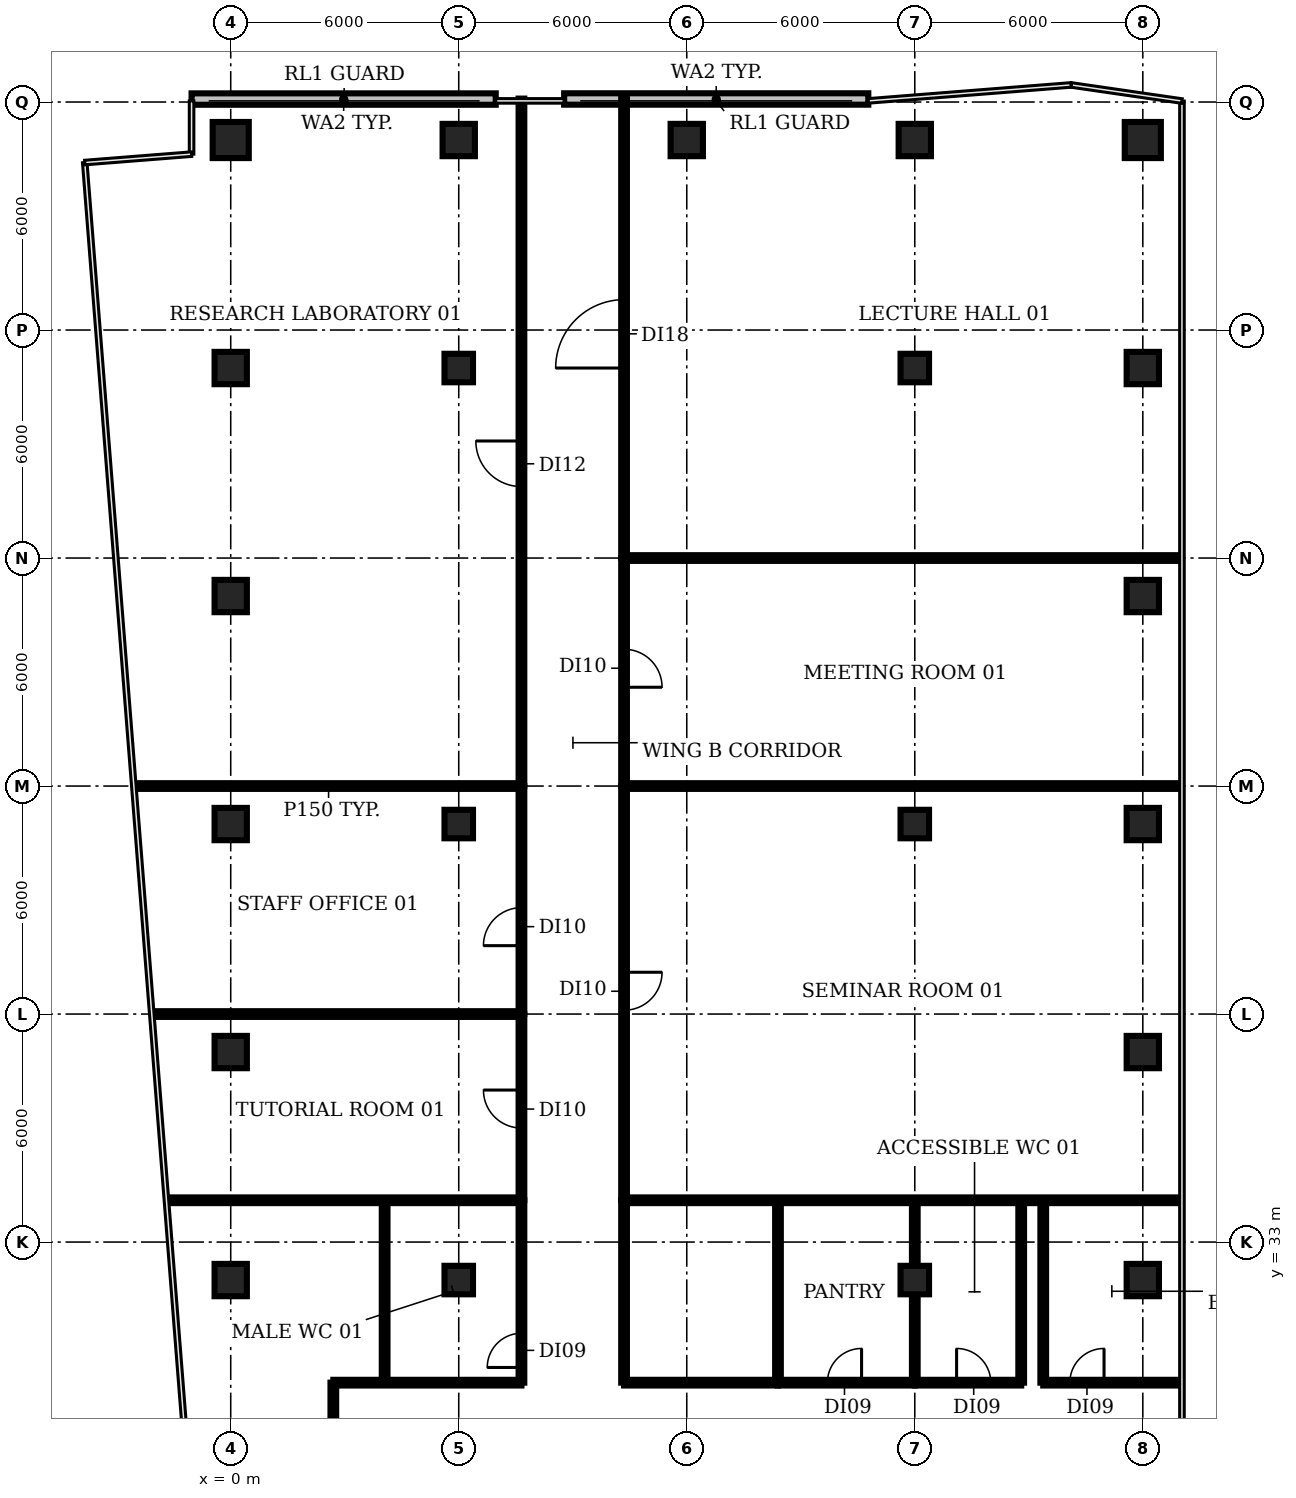
"""IFC4 building model, lengths in metres.
Left out: names, types, materials, properties, quantities, classifications, styles, units other than length and angle.
Written with IfcOpenShell. Run it as: python <this file> out.ifc"""

import sys

from ifc_helpers import new_model, si_unit, direction, frame, frame_2d, origin, origin_2d, place, context, subcontext, project, spatial, rectangle, circle, extrude, element, fill, save


model = new_model("IFC4")
c1 = context("Model", 3, precision=1e-05, world=origin(), true_north=direction((0.0, 1.0)))
c2 = subcontext(c1, "Body", "Model", "MODEL_VIEW")
j1 = project(units=[si_unit("LENGTHUNIT", "METRE"), si_unit("PLANEANGLEUNIT", "RADIAN")], contexts=[c1])
p1 = place(None, origin())
s1 = spatial("IfcSite", under=j1, at=p1, CompositionType="ELEMENT")
p2 = place(p1, origin())
s2 = spatial("IfcBuilding", under=s1, at=p2, CompositionType="ELEMENT")
p3 = place(p2, frame((0.0, 0.0, 188.6)))
s3 = spatial("IfcBuildingStorey", under=s2, at=p3, CompositionType="ELEMENT", Elevation=188.6)
for number, where, z_axis, x_axis in (
    (1, (0.0, 32.0, 0.0), (0.0, 0.0, 1.0), (1.0, 0.0, 0.0)),
    (2, (0.0, 38.0, 0.0), (0.0, 0.0, 1.0), (1.0, 0.0, 0.0)),
    (3, (0.0, 44.0, 0.0), (0.0, 0.0, 1.0), (1.0, 0.0, 0.0)),
    (4, (0.0, 50.0, 0.0), (0.0, 0.0, 1.0), (1.0, 0.0, 0.0)),
    (5, (0.0, 56.0, 0.0), (0.0, 0.0, 1.0), (1.0, 0.0, 0.0)),
):
    element("IfcColumn", number, at=place(p3, frame(where, z_axis=z_axis, x_axis=x_axis)), inside=s3, PredefinedType="COLUMN", context=c2, shape_type="SweptSolid", body=[
        extrude(rectangle(XDim=0.85, YDim=0.85, at=origin_2d()), origin(), (0.0, 0.0, 1.0), 3.85),
    ])
p4 = place(p3, frame((0.0, 62.0, 0.0), z_axis=(0.0, 0.0, 1.0), x_axis=(1.0, 0.0, 0.0)))
e6 = element("IfcColumn", 6, at=p4, inside=s3, PredefinedType="COLUMN", context=c2, shape_type="SweptSolid", body=[
    extrude(circle(Radius=0.475, at=origin_2d()), origin(), (0.0, 0.0, 1.0), 3.85),
])
for number, where, z_axis, x_axis in (
    (7, (6.0, 32.0, 0.0), (0.0, 0.0, 1.0), (1.0, 0.0, 0.0)),
    (8, (6.0, 44.0, 0.0), (0.0, 0.0, 1.0), (1.0, 0.0, 0.0)),
    (9, (6.0, 56.0, 0.0), (0.0, 0.0, 1.0), (1.0, 0.0, 0.0)),
):
    element("IfcColumn", number, at=place(p3, frame(where, z_axis=z_axis, x_axis=x_axis)), inside=s3, PredefinedType="COLUMN", context=c2, shape_type="SweptSolid", body=[
        extrude(rectangle(XDim=0.75, YDim=0.75, at=origin_2d()), origin(), (0.0, 0.0, 1.0), 3.85),
    ])
for number, where, z_axis, x_axis in (
    (10, (6.0, 62.0, 0.0), (0.0, 0.0, 1.0), (1.0, 0.0, 0.0)),
    (11, (12.0, 62.0, 0.0), (0.0, 0.0, 1.0), (1.0, 0.0, 0.0)),
):
    element("IfcColumn", number, at=place(p3, frame(where, z_axis=z_axis, x_axis=x_axis)), inside=s3, PredefinedType="COLUMN", context=c2, shape_type="SweptSolid", body=[
        extrude(rectangle(XDim=0.85, YDim=0.85, at=origin_2d()), origin(), (0.0, 0.0, 1.0), 3.85),
    ])
for number, where, z_axis, x_axis in (
    (12, (18.0, 32.0, 0.0), (0.0, 0.0, 1.0), (1.0, 0.0, 0.0)),
    (13, (18.0, 44.0, 0.0), (0.0, 0.0, 1.0), (1.0, 0.0, 0.0)),
    (14, (18.0, 56.0, 0.0), (0.0, 0.0, 1.0), (1.0, 0.0, 0.0)),
):
    element("IfcColumn", number, at=place(p3, frame(where, z_axis=z_axis, x_axis=x_axis)), inside=s3, PredefinedType="COLUMN", context=c2, shape_type="SweptSolid", body=[
        extrude(rectangle(XDim=0.75, YDim=0.75, at=origin_2d()), origin(), (0.0, 0.0, 1.0), 3.85),
    ])
for number, where, z_axis, x_axis in (
    (15, (18.0, 62.0, 0.0), (0.0, 0.0, 1.0), (1.0, 0.0, 0.0)),
    (16, (24.0, 32.0, 0.0), (0.0, 0.0, 1.0), (1.0, 0.0, 0.0)),
    (17, (24.0, 38.0, 0.0), (0.0, 0.0, 1.0), (1.0, 0.0, 0.0)),
    (18, (24.0, 44.0, 0.0), (0.0, 0.0, 1.0), (1.0, 0.0, 0.0)),
    (19, (24.0, 50.0, 0.0), (0.0, 0.0, 1.0), (1.0, 0.0, 0.0)),
    (20, (24.0, 56.0, 0.0), (0.0, 0.0, 1.0), (1.0, 0.0, 0.0)),
):
    element("IfcColumn", number, at=place(p3, frame(where, z_axis=z_axis, x_axis=x_axis)), inside=s3, PredefinedType="COLUMN", context=c2, shape_type="SweptSolid", body=[
        extrude(rectangle(XDim=0.85, YDim=0.85, at=origin_2d()), origin(), (0.0, 0.0, 1.0), 3.85),
    ])
p5 = place(p3, frame((24.0, 62.0, 0.0), z_axis=(0.0, 0.0, 1.0), x_axis=(1.0, 0.0, 0.0)))
e21 = element("IfcColumn", 21, at=p5, inside=s3, PredefinedType="COLUMN", context=c2, shape_type="SweptSolid", body=[
    extrude(circle(Radius=0.475, at=origin_2d()), origin(), (0.0, 0.0, 1.0), 3.85),
])
for number, where, z_axis, x_axis in (
    (22, (16.777, 63.08, 0.0), (0.0, 0.0, 1.0), (-1.0, 0.0, 0.0)),
    (23, (6.973, 63.078, 0.0), (0.0, 0.0, 1.0), (-1.0, 0.0, 0.0)),
):
    element("IfcWall", number, at=place(p3, frame(where, z_axis=z_axis, x_axis=x_axis)), inside=s3, PredefinedType="SOLIDWALL", context=c2, shape_type="SweptSolid", body=[
        extrude(rectangle(XDim=8.003, YDim=0.3, at=frame_2d((4.002, 0.0))), origin(), (0.0, 0.0, 1.0), 3.85),
    ])
p6 = place(p3, frame((-2.5, 45.0, 0.0), z_axis=(0.0, 0.0, 1.0), x_axis=(1.0, 0.0, 0.0)))
e24 = element("IfcWall", 24, at=p6, inside=s3, PredefinedType="PARTITIONING", context=c2, shape_type="SweptSolid", body=[
    extrude(rectangle(XDim=10.15, YDim=0.15, at=frame_2d((5.075, 0.0))), origin(), (0.0, 0.0, 1.0), 2.88),
])
p7 = place(p3, frame((-2.03, 39.0, 0.0), z_axis=(0.0, 0.0, 1.0), x_axis=(1.0, 0.0, 0.0)))
e25 = element("IfcWall", 25, at=p7, inside=s3, PredefinedType="PARTITIONING", context=c2, shape_type="SweptSolid", body=[
    extrude(rectangle(XDim=9.68, YDim=0.15, at=frame_2d((4.84, 0.0))), origin(), (0.0, 0.0, 1.0), 2.88),
])
p8 = place(p3, frame((-1.64, 34.1, 0.0), z_axis=(0.0, 0.0, 1.0), x_axis=(1.0, 0.0, 0.0)))
e26 = element("IfcWall", 26, at=p8, inside=s3, PredefinedType="PARTITIONING", context=c2, shape_type="SweptSolid", body=[
    extrude(rectangle(XDim=9.29, YDim=0.15, at=frame_2d((4.645, 0.0))), origin(), (0.0, 0.0, 1.0), 2.88),
])
p9 = place(p3, frame((2.7, 25.4, 0.0), z_axis=(0.0, 0.0, 1.0), x_axis=(0.0, 1.0, 0.0)))
e27 = element("IfcWall", 27, at=p9, inside=s3, PredefinedType="PARTITIONING", context=c2, shape_type="SweptSolid", body=[
    extrude(rectangle(XDim=3.9, YDim=0.15, at=frame_2d((1.95, 0.0))), origin(), (0.0, 0.0, 1.0), 2.88),
])
p10 = place(p3, frame((2.7, 29.3, 0.0), z_axis=(0.0, 0.0, 1.0), x_axis=(1.0, 0.0, 0.0)))
e28 = element("IfcWall", 28, at=p10, inside=s3, PredefinedType="PARTITIONING", context=c2, shape_type="SweptSolid", body=[
    extrude(rectangle(XDim=4.95, YDim=0.15, at=frame_2d((2.475, 0.0))), origin(), (0.0, 0.0, 1.0), 2.88),
])
p11 = place(p3, frame((4.05, 29.3, 0.0), z_axis=(0.0, 0.0, 1.0), x_axis=(0.0, 1.0, 0.0)))
e29 = element("IfcWall", 29, at=p11, inside=s3, PredefinedType="PARTITIONING", context=c2, shape_type="SweptSolid", body=[
    extrude(rectangle(XDim=4.8, YDim=0.15, at=frame_2d((2.4, 0.0))), origin(), (0.0, 0.0, 1.0), 2.88),
])
p12 = place(p3, frame((7.65, 29.3, 0.0), z_axis=(0.0, 0.0, 1.0), x_axis=(0.0, 1.0, 0.0)))
e30 = element("IfcWall", 30, at=p12, inside=s3, PredefinedType="PARTITIONING", context=c2, shape_type="SweptSolid", body=[
    extrude(rectangle(XDim=4.8, YDim=0.15, at=frame_2d((2.4, 0.0))), origin(), (0.0, 0.0, 1.0), 2.88),
])
p13 = place(p12, frame((0.4, 0.0, 0.0)))
e31 = element("IfcOpeningElement", 31, at=p13, cuts=e30, PredefinedType="OPENING", context=c2, shape_type="SweptSolid", body=[
    extrude(rectangle(XDim=0.9, YDim=2.1, at=frame_2d((0.45, 1.05))), frame((0.0, 0.085, 0.0), z_axis=(0.0, -1.0, 0.0), x_axis=(1.0, 0.0, 0.0)), (0.0, 0.0, 1.0), 0.17),
])
p14 = place(p3, frame((7.65, 34.1, 0.0), z_axis=(0.0, 0.0, 1.0), x_axis=(0.0, 1.0, 0.0)))
e32 = element("IfcWall", 32, at=p14, inside=s3, PredefinedType="PARTITIONING", context=c2, shape_type="SweptSolid", body=[
    extrude(rectangle(XDim=4.9, YDim=0.15, at=frame_2d((2.45, 0.0))), origin(), (0.0, 0.0, 1.0), 2.88),
])
p15 = place(p14, frame((1.9, 0.0, 0.0)))
e33 = element("IfcOpeningElement", 33, at=p15, cuts=e32, PredefinedType="OPENING", context=c2, shape_type="SweptSolid", body=[
    extrude(rectangle(XDim=1.0, YDim=2.1, at=frame_2d((0.5, 1.05))), frame((0.0, 0.085, 0.0), z_axis=(0.0, -1.0, 0.0), x_axis=(1.0, 0.0, 0.0)), (0.0, 0.0, 1.0), 0.17),
])
p16 = place(p3, frame((7.65, 39.0, 0.0), z_axis=(0.0, 0.0, 1.0), x_axis=(0.0, 1.0, 0.0)))
e34 = element("IfcWall", 34, at=p16, inside=s3, PredefinedType="PARTITIONING", context=c2, shape_type="SweptSolid", body=[
    extrude(rectangle(XDim=6.0, YDim=0.15, at=frame_2d((3.0, 0.0))), origin(), (0.0, 0.0, 1.0), 2.88),
])
p17 = place(p16, frame((1.8, 0.0, 0.0)))
e35 = element("IfcOpeningElement", 35, at=p17, cuts=e34, PredefinedType="OPENING", context=c2, shape_type="SweptSolid", body=[
    extrude(rectangle(XDim=1.0, YDim=2.1, at=frame_2d((0.5, 1.05))), frame((0.0, 0.085, 0.0), z_axis=(0.0, -1.0, 0.0), x_axis=(1.0, 0.0, 0.0)), (0.0, 0.0, 1.0), 0.17),
])
p18 = place(p3, frame((7.65, 45.0, 0.0), z_axis=(0.0, 0.0, 1.0), x_axis=(0.0, 1.0, 0.0)))
e36 = element("IfcWall", 36, at=p18, inside=s3, PredefinedType="PARTITIONING", context=c2, shape_type="SweptSolid", body=[
    extrude(rectangle(XDim=18.09, YDim=0.15, at=frame_2d((9.045, 0.0))), origin(), (0.0, 0.0, 1.0), 2.88),
])
p19 = place(p18, frame((7.88, 0.0, 0.0)))
e37 = element("IfcOpeningElement", 37, at=p19, cuts=e36, PredefinedType="OPENING", context=c2, shape_type="SweptSolid", body=[
    extrude(rectangle(XDim=1.2, YDim=2.1, at=frame_2d((0.6, 1.05))), frame((0.0, 0.085, 0.0), z_axis=(0.0, -1.0, 0.0), x_axis=(1.0, 0.0, 0.0)), (0.0, 0.0, 1.0), 0.17),
])
p20 = place(p3, frame((10.35, 29.3, 0.0), z_axis=(0.0, 0.0, 1.0), x_axis=(0.0, 1.0, 0.0)))
e38 = element("IfcWall", 38, at=p20, inside=s3, PredefinedType="PARTITIONING", context=c2, shape_type="SweptSolid", body=[
    extrude(rectangle(XDim=4.8, YDim=0.15, at=frame_2d((2.4, 0.0))), origin(), (0.0, 0.0, 1.0), 2.88),
])
p21 = place(p3, frame((10.35, 29.3, 0.0), z_axis=(0.0, 0.0, 1.0), x_axis=(1.0, 0.0, 0.0)))
e39 = element("IfcWall", 39, at=p21, inside=s3, PredefinedType="PARTITIONING", context=c2, shape_type="SweptSolid", body=[
    extrude(rectangle(XDim=4.05, YDim=0.15, at=frame_2d((2.025, 0.0))), origin(), (0.0, 0.0, 1.0), 2.88),
])
p22 = place(p3, frame((10.35, 34.1, 0.0), z_axis=(0.0, 0.0, 1.0), x_axis=(1.0, 0.0, 0.0)))
e40 = element("IfcWall", 40, at=p22, inside=s3, PredefinedType="PARTITIONING", context=c2, shape_type="SweptSolid", body=[
    extrude(rectangle(XDim=14.63, YDim=0.15, at=frame_2d((7.315, 0.0))), origin(), (0.0, 0.0, 1.0), 2.88),
])
p23 = place(p3, frame((10.35, 45.0, 0.0), z_axis=(0.0, 0.0, 1.0), x_axis=(0.0, -1.0, 0.0)))
e41 = element("IfcWall", 41, at=p23, inside=s3, PredefinedType="PARTITIONING", context=c2, shape_type="SweptSolid", body=[
    extrude(rectangle(XDim=10.9, YDim=0.15, at=frame_2d((5.45, 0.0))), origin(), (0.0, 0.0, 1.0), 2.88),
])
p24 = place(p23, frame((4.9, 0.0, 0.0)))
e42 = element("IfcOpeningElement", 42, at=p24, cuts=e41, PredefinedType="OPENING", context=c2, shape_type="SweptSolid", body=[
    extrude(rectangle(XDim=1.0, YDim=2.1, at=frame_2d((0.5, 1.05))), frame((0.0, 0.085, 0.0), z_axis=(0.0, -1.0, 0.0), x_axis=(1.0, 0.0, 0.0)), (0.0, 0.0, 1.0), 0.17),
])
p25 = place(p3, frame((10.35, 45.0, 0.0), z_axis=(0.0, 0.0, 1.0), x_axis=(1.0, 0.0, 0.0)))
e43 = element("IfcWall", 43, at=p25, inside=s3, PredefinedType="PARTITIONING", context=c2, shape_type="SweptSolid", body=[
    extrude(rectangle(XDim=14.615, YDim=0.15, at=frame_2d((7.308, 0.0))), origin(), (0.0, 0.0, 1.0), 2.88),
])
p26 = place(p3, frame((10.35, 51.0, 0.0), z_axis=(0.0, 0.0, 1.0), x_axis=(0.0, -1.0, 0.0)))
e44 = element("IfcWall", 44, at=p26, inside=s3, PredefinedType="PARTITIONING", context=c2, shape_type="SweptSolid", body=[
    extrude(rectangle(XDim=6.0, YDim=0.15, at=frame_2d((3.0, 0.0))), origin(), (0.0, 0.0, 1.0), 2.88),
])
p27 = place(p26, frame((2.4, 0.0, 0.0)))
e45 = element("IfcOpeningElement", 45, at=p27, cuts=e44, PredefinedType="OPENING", context=c2, shape_type="SweptSolid", body=[
    extrude(rectangle(XDim=1.0, YDim=2.1, at=frame_2d((0.5, 1.05))), frame((0.0, 0.085, 0.0), z_axis=(0.0, -1.0, 0.0), x_axis=(1.0, 0.0, 0.0)), (0.0, 0.0, 1.0), 0.17),
])
p28 = place(p3, frame((10.35, 51.0, 0.0), z_axis=(0.0, 0.0, 1.0), x_axis=(0.0, 1.0, 0.0)))
e46 = element("IfcWall", 46, at=p28, inside=s3, PredefinedType="PARTITIONING", context=c2, shape_type="SweptSolid", body=[
    extrude(rectangle(XDim=12.09, YDim=0.15, at=frame_2d((6.045, 0.0))), origin(), (0.0, 0.0, 1.0), 2.88),
])
p29 = place(p28, frame((5.0, 0.0, 0.0)))
e47 = element("IfcOpeningElement", 47, at=p29, cuts=e46, PredefinedType="OPENING", context=c2, shape_type="SweptSolid", body=[
    extrude(rectangle(XDim=1.8, YDim=2.1, at=frame_2d((0.9, 1.05))), frame((0.0, 0.085, 0.0), z_axis=(0.0, -1.0, 0.0), x_axis=(1.0, 0.0, 0.0)), (0.0, 0.0, 1.0), 0.17),
])
p30 = place(p3, frame((10.35, 51.0, 0.0), z_axis=(0.0, 0.0, 1.0), x_axis=(1.0, 0.0, 0.0)))
e48 = element("IfcWall", 48, at=p30, inside=s3, PredefinedType="PARTITIONING", context=c2, shape_type="SweptSolid", body=[
    extrude(rectangle(XDim=14.615, YDim=0.15, at=frame_2d((7.308, 0.0))), origin(), (0.0, 0.0, 1.0), 2.88),
])
p31 = place(p3, frame((14.4, 29.3, 0.0), z_axis=(0.0, 0.0, 1.0), x_axis=(0.0, 1.0, 0.0)))
e49 = element("IfcWall", 49, at=p31, inside=s3, PredefinedType="PARTITIONING", context=c2, shape_type="SweptSolid", body=[
    extrude(rectangle(XDim=4.8, YDim=0.15, at=frame_2d((2.4, 0.0))), origin(), (0.0, 0.0, 1.0), 2.88),
])
p32 = place(p3, frame((14.4, 29.3, 0.0), z_axis=(0.0, 0.0, 1.0), x_axis=(1.0, 0.0, 0.0)))
e50 = element("IfcWall", 50, at=p32, inside=s3, PredefinedType="PARTITIONING", context=c2, shape_type="SweptSolid", body=[
    extrude(rectangle(XDim=3.6, YDim=0.15, at=frame_2d((1.8, 0.0))), origin(), (0.0, 0.0, 1.0), 2.88),
])
p33 = place(p32, frame((1.3, 0.0, 0.0)))
e51 = element("IfcOpeningElement", 51, at=p33, cuts=e50, PredefinedType="OPENING", context=c2, shape_type="SweptSolid", body=[
    extrude(rectangle(XDim=0.9, YDim=2.1, at=frame_2d((0.45, 1.05))), frame((0.0, 0.085, 0.0), z_axis=(0.0, -1.0, 0.0), x_axis=(1.0, 0.0, 0.0)), (0.0, 0.0, 1.0), 0.17),
])
p34 = place(p3, frame((18.0, 29.3, 0.0), z_axis=(0.0, 0.0, 1.0), x_axis=(0.0, 1.0, 0.0)))
e52 = element("IfcWall", 52, at=p34, inside=s3, PredefinedType="PARTITIONING", context=c2, shape_type="SweptSolid", body=[
    extrude(rectangle(XDim=4.8, YDim=0.15, at=frame_2d((2.4, 0.0))), origin(), (0.0, 0.0, 1.0), 2.88),
])
p35 = place(p3, frame((18.0, 29.3, 0.0), z_axis=(0.0, 0.0, 1.0), x_axis=(1.0, 0.0, 0.0)))
e53 = element("IfcWall", 53, at=p35, inside=s3, PredefinedType="PARTITIONING", context=c2, shape_type="SweptSolid", body=[
    extrude(rectangle(XDim=2.8, YDim=0.15, at=frame_2d((1.4, 0.0))), origin(), (0.0, 0.0, 1.0), 2.88),
])
p36 = place(p35, frame((1.1, 0.0, 0.0)))
e54 = element("IfcOpeningElement", 54, at=p36, cuts=e53, PredefinedType="OPENING", context=c2, shape_type="SweptSolid", body=[
    extrude(rectangle(XDim=0.9, YDim=2.1, at=frame_2d((0.45, 1.05))), frame((0.0, 0.085, 0.0), z_axis=(0.0, -1.0, 0.0), x_axis=(1.0, 0.0, 0.0)), (0.0, 0.0, 1.0), 0.17),
])
for number, where, z_axis, x_axis in (
    (55, (20.8, 29.3, 0.0), (0.0, 0.0, 1.0), (0.0, 1.0, 0.0)),
    (56, (21.38, 29.3, 0.0), (0.0, 0.0, 1.0), (0.0, 1.0, 0.0)),
):
    element("IfcWall", number, at=place(p3, frame(where, z_axis=z_axis, x_axis=x_axis)), inside=s3, PredefinedType="PARTITIONING", context=c2, shape_type="SweptSolid", body=[
        extrude(rectangle(XDim=4.8, YDim=0.15, at=frame_2d((2.4, 0.0))), origin(), (0.0, 0.0, 1.0), 2.88),
    ])
p37 = place(p3, frame((21.38, 29.3, 0.0), z_axis=(0.0, 0.0, 1.0), x_axis=(1.0, 0.0, 0.0)))
e57 = element("IfcWall", 57, at=p37, inside=s3, PredefinedType="PARTITIONING", context=c2, shape_type="SweptSolid", body=[
    extrude(rectangle(XDim=3.6, YDim=0.15, at=frame_2d((1.8, 0.0))), origin(), (0.0, 0.0, 1.0), 2.88),
])
p38 = place(p37, frame((0.7, 0.0, 0.0)))
e58 = element("IfcOpeningElement", 58, at=p38, cuts=e57, PredefinedType="OPENING", context=c2, shape_type="SweptSolid", body=[
    extrude(rectangle(XDim=0.9, YDim=2.1, at=frame_2d((0.45, 1.05))), frame((0.0, 0.085, 0.0), z_axis=(0.0, -1.0, 0.0), x_axis=(1.0, 0.0, 0.0)), (0.0, 0.0, 1.0), 0.17),
])
p39 = place(p13, origin())
e59 = element("IfcDoor", 59, at=p39, inside=s3, OperationType="SINGLE_SWING_LEFT", PredefinedType="DOOR", context=c2, shape_type="SweptSolid", body=[
    extrude(rectangle(XDim=0.9, YDim=2.1, at=frame_2d((0.45, 1.05))), frame((0.0, 0.025, 0.0), z_axis=(0.0, -1.0, 0.0), x_axis=(1.0, 0.0, 0.0)), (0.0, 0.0, 1.0), 0.05),
])
fill(e31, e59)
p40 = place(p15, origin())
e60 = element("IfcDoor", 60, at=p40, inside=s3, OperationType="SINGLE_SWING_RIGHT", PredefinedType="DOOR", context=c2, shape_type="SweptSolid", body=[
    extrude(rectangle(XDim=1.0, YDim=2.1, at=frame_2d((0.5, 1.05))), frame((0.0, 0.025, 0.0), z_axis=(0.0, -1.0, 0.0), x_axis=(1.0, 0.0, 0.0)), (0.0, 0.0, 1.0), 0.05),
])
fill(e33, e60)
p41 = place(p17, origin())
e61 = element("IfcDoor", 61, at=p41, inside=s3, OperationType="SINGLE_SWING_LEFT", PredefinedType="DOOR", context=c2, shape_type="SweptSolid", body=[
    extrude(rectangle(XDim=1.0, YDim=2.1, at=frame_2d((0.5, 1.05))), frame((0.0, 0.025, 0.0), z_axis=(0.0, -1.0, 0.0), x_axis=(1.0, 0.0, 0.0)), (0.0, 0.0, 1.0), 0.05),
])
fill(e35, e61)
p42 = place(p19, origin())
e62 = element("IfcDoor", 62, at=p42, inside=s3, OperationType="SINGLE_SWING_RIGHT", PredefinedType="DOOR", context=c2, shape_type="SweptSolid", body=[
    extrude(rectangle(XDim=1.2, YDim=2.1, at=frame_2d((0.6, 1.05))), frame((0.0, 0.025, 0.0), z_axis=(0.0, -1.0, 0.0), x_axis=(1.0, 0.0, 0.0)), (0.0, 0.0, 1.0), 0.05),
])
fill(e37, e62)
p43 = place(p24, origin())
e63 = element("IfcDoor", 63, at=p43, inside=s3, OperationType="SINGLE_SWING_LEFT", PredefinedType="DOOR", context=c2, shape_type="SweptSolid", body=[
    extrude(rectangle(XDim=1.0, YDim=2.1, at=frame_2d((0.5, 1.05))), frame((0.0, 0.025, 0.0), z_axis=(0.0, -1.0, 0.0), x_axis=(1.0, 0.0, 0.0)), (0.0, 0.0, 1.0), 0.05),
])
fill(e42, e63)
p44 = place(p27, origin())
e64 = element("IfcDoor", 64, at=p44, inside=s3, OperationType="SINGLE_SWING_RIGHT", PredefinedType="DOOR", context=c2, shape_type="SweptSolid", body=[
    extrude(rectangle(XDim=1.0, YDim=2.1, at=frame_2d((0.5, 1.05))), frame((0.0, 0.025, 0.0), z_axis=(0.0, -1.0, 0.0), x_axis=(1.0, 0.0, 0.0)), (0.0, 0.0, 1.0), 0.05),
])
fill(e45, e64)
p45 = place(p29, origin())
e65 = element("IfcDoor", 65, at=p45, inside=s3, OperationType="SINGLE_SWING_LEFT", PredefinedType="DOOR", context=c2, shape_type="SweptSolid", body=[
    extrude(rectangle(XDim=1.8, YDim=2.1, at=frame_2d((0.9, 1.05))), frame((0.0, 0.025, 0.0), z_axis=(0.0, -1.0, 0.0), x_axis=(1.0, 0.0, 0.0)), (0.0, 0.0, 1.0), 0.05),
])
fill(e47, e65)
p46 = place(p33, origin())
e66 = element("IfcDoor", 66, at=p46, inside=s3, OperationType="SINGLE_SWING_RIGHT", PredefinedType="DOOR", context=c2, shape_type="SweptSolid", body=[
    extrude(rectangle(XDim=0.9, YDim=2.1, at=frame_2d((0.45, 1.05))), frame((0.0, 0.025, 0.0), z_axis=(0.0, -1.0, 0.0), x_axis=(1.0, 0.0, 0.0)), (0.0, 0.0, 1.0), 0.05),
])
fill(e51, e66)
p47 = place(p36, origin())
e67 = element("IfcDoor", 67, at=p47, inside=s3, OperationType="SINGLE_SWING_LEFT", PredefinedType="DOOR", context=c2, shape_type="SweptSolid", body=[
    extrude(rectangle(XDim=0.9, YDim=2.1, at=frame_2d((0.45, 1.05))), frame((0.0, 0.025, 0.0), z_axis=(0.0, -1.0, 0.0), x_axis=(1.0, 0.0, 0.0)), (0.0, 0.0, 1.0), 0.05),
])
fill(e54, e67)
p48 = place(p38, origin())
e68 = element("IfcDoor", 68, at=p48, inside=s3, OperationType="SINGLE_SWING_RIGHT", PredefinedType="DOOR", context=c2, shape_type="SweptSolid", body=[
    extrude(rectangle(XDim=0.9, YDim=2.1, at=frame_2d((0.45, 1.05))), frame((0.0, 0.025, 0.0), z_axis=(0.0, -1.0, 0.0), x_axis=(1.0, 0.0, 0.0)), (0.0, 0.0, 1.0), 0.05),
])
fill(e58, e68)
save(model, sys.argv[1])
